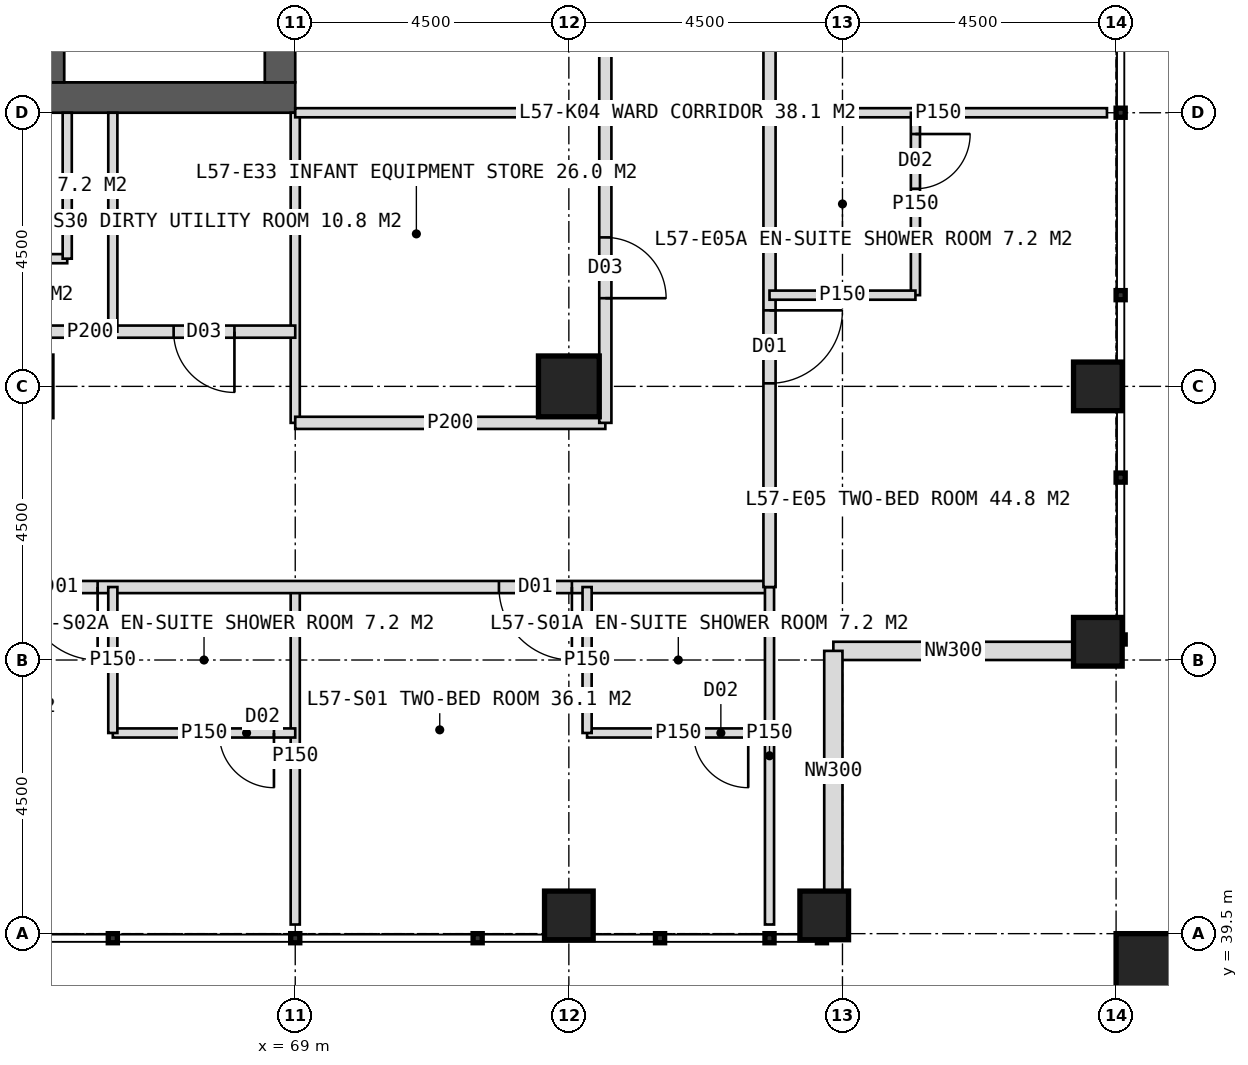
"""IFC4 building model, lengths in metres.
Left out: names, types, materials, properties, quantities, classifications, styles, units other than length and angle.
Written with IfcOpenShell. Run it as: python <this file> out.ifc"""

import sys

from ifc_helpers import new_model, si_unit, direction, frame, frame_2d, origin, origin_2d, place, context, subcontext, project, spatial, rectangle, hollow_rectangle, extrude, element, fill, save


model = new_model("IFC4")
c1 = context("Model", 3, precision=1e-05, world=origin(), true_north=direction((0.0, 1.0)))
c2 = subcontext(c1, "Body", "Model", "MODEL_VIEW")
j1 = project(units=[si_unit("LENGTHUNIT", "METRE"), si_unit("PLANEANGLEUNIT", "RADIAN")], contexts=[c1])
p1 = place(None, origin())
s1 = spatial("IfcSite", under=j1, at=p1, CompositionType="ELEMENT")
p2 = place(p1, origin())
s2 = spatial("IfcBuilding", under=s1, at=p2, CompositionType="ELEMENT")
p3 = place(p2, frame((0.0, 0.0, 237.0)))
s3 = spatial("IfcBuildingStorey", under=s2, at=p3, CompositionType="ELEMENT", Elevation=237.0)
p4 = place(p3, frame((51.0, 53.25, 0.0), z_axis=(0.0, 0.0, 1.0), x_axis=(1.0, 0.0, 0.0)))
e1 = element("IfcWall", 1, at=p4, inside=s3, PredefinedType="SHEAR", context=c2, shape_type="SweptSolid", body=[
    extrude(rectangle(XDim=18.0, YDim=0.5, at=frame_2d((9.0, 0.0))), origin(), (0.0, 0.0, 1.0), 4.0),
])
p5 = place(p4, frame((8.1, 0.0, 0.0)))
e2 = element("IfcOpeningElement", 2, at=p5, cuts=e1, PredefinedType="OPENING", context=c2, shape_type="SweptSolid", body=[
    extrude(rectangle(XDim=1.8, YDim=2.2, at=frame_2d((0.9, 1.1))), frame((0.0, 0.26, 0.0), z_axis=(0.0, -1.0, 0.0), x_axis=(1.0, 0.0, 0.0)), (0.0, 0.0, 1.0), 0.52),
])
p6 = place(p3, frame((68.75, 53.5, 0.0), z_axis=(0.0, 0.0, 1.0), x_axis=(0.0, 1.0, 0.0)))
e3 = element("IfcWall", 3, at=p6, inside=s3, PredefinedType="SHEAR", context=c2, shape_type="SweptSolid", body=[
    extrude(rectangle(XDim=17.0, YDim=0.5, at=frame_2d((8.5, 0.0))), origin(), (0.0, 0.0, 1.0), 4.0),
])
p7 = place(p6, frame((9.6, 0.0, 0.0)))
e4 = element("IfcOpeningElement", 4, at=p7, cuts=e3, PredefinedType="OPENING", context=c2, shape_type="SweptSolid", body=[
    extrude(rectangle(XDim=1.5, YDim=2.2, at=frame_2d((0.75, 1.1))), frame((0.0, 0.26, 0.0), z_axis=(0.0, -1.0, 0.0), x_axis=(1.0, 0.0, 0.0)), (0.0, 0.0, 1.0), 0.52),
])
p8 = place(p3, frame((65.05, 53.5, 0.0), z_axis=(0.0, 0.0, 1.0), x_axis=(0.0, 1.0, 0.0)))
e5 = element("IfcWall", 5, at=p8, inside=s3, PredefinedType="SHEAR", context=c2, shape_type="SweptSolid", body=[
    extrude(rectangle(XDim=17.0, YDim=0.3, at=frame_2d((8.5, 0.0))), origin(), (0.0, 0.0, 1.0), 4.0),
])
p9 = place(p3, frame((73.5, 48.5, 0.0), z_axis=(0.0, 0.0, 1.0), x_axis=(1.0, 0.0, 0.0)))
e6 = element("IfcColumn", 6, at=p9, inside=s3, PredefinedType="COLUMN", context=c2, shape_type="SweptSolid", body=[
    extrude(hollow_rectangle(XDim=1.0, YDim=1.0, WallThickness=0.1, at=origin_2d()), origin(), (0.0, 0.0, 1.0), 4.0),
])
for number, where, z_axis, x_axis in (
    (7, (82.2, 44.3, 0.0), (0.0, 0.0, 1.0), (1.0, 0.0, 0.0)),
    (8, (82.2, 48.5, 0.0), (0.0, 0.0, 1.0), (1.0, 0.0, 0.0)),
    (9, (73.5, 39.8, 0.0), (0.0, 0.0, 1.0), (1.0, 0.0, 0.0)),
    (10, (77.7, 39.8, 0.0), (0.0, 0.0, 1.0), (1.0, 0.0, 0.0)),
):
    element("IfcColumn", number, at=place(p3, frame(where, z_axis=z_axis, x_axis=x_axis)), inside=s3, PredefinedType="COLUMN", context=c2, shape_type="SweptSolid", body=[
        extrude(hollow_rectangle(XDim=0.8, YDim=0.8, WallThickness=0.08, at=origin_2d()), origin(), (0.0, 0.0, 1.0), 4.0),
    ])
p10 = place(p3, frame((83.1, 38.9, 0.0), z_axis=(0.0, 0.0, 1.0), x_axis=(1.0, 0.0, 0.0)))
e11 = element("IfcColumn", 11, at=p10, inside=s3, PredefinedType="COLUMN", context=c2, shape_type="SweptSolid", body=[
    extrude(hollow_rectangle(XDim=1.2, YDim=1.2, WallThickness=0.07, at=origin_2d()), origin(), (0.0, 0.0, 1.0), 4.0),
])
for number, where, z_axis, x_axis in (
    (12, (81.8, 44.15, 0.0), (0.0, 0.0, 1.0), (-1.0, 0.0, 0.0)),
    (13, (77.85, 44.15, 0.0), (0.0, 0.0, 1.0), (0.0, -1.0, 0.0)),
):
    element("IfcWall", number, at=place(p3, frame(where, z_axis=z_axis, x_axis=x_axis)), inside=s3, PredefinedType="ELEMENTEDWALL", context=c2, shape_type="SweptSolid", body=[
        extrude(rectangle(XDim=3.95, YDim=0.3, at=frame_2d((1.975, 0.0))), origin(), (0.0, 0.0, 1.0), 2.85),
    ])
p11 = place(p3, frame((69.0, 45.2, 0.0), z_axis=(0.0, 0.0, 1.0), x_axis=(0.0, -1.0, 0.0)))
e14 = element("IfcWall", 14, at=p11, inside=s3, PredefinedType="PARTITIONING", context=c2, shape_type="SweptSolid", body=[
    extrude(rectangle(XDim=5.55, YDim=0.15, at=frame_2d((2.775, 0.0))), origin(), (0.0, 0.0, 1.0), 3.75),
])
p12 = place(p3, frame((76.8, 45.2, 0.0), z_axis=(0.0, 0.0, 1.0), x_axis=(-1.0, 0.0, 0.0)))
e15 = element("IfcWall", 15, at=p12, inside=s3, PredefinedType="PARTITIONING", context=c2, shape_type="SweptSolid", body=[
    extrude(rectangle(XDim=33.6, YDim=0.2, at=frame_2d((16.8, 0.0))), origin(), (0.0, 0.0, 1.0), 3.75),
])
p13 = place(p12, frame((3.25, 0.0, 0.0)))
e16 = element("IfcOpeningElement", 16, at=p13, cuts=e15, PredefinedType="OPENING", context=c2, shape_type="SweptSolid", body=[
    extrude(rectangle(XDim=1.2, YDim=2.2, at=frame_2d((0.6, 1.1))), frame((0.0, 0.11, 0.0), z_axis=(0.0, -1.0, 0.0), x_axis=(1.0, 0.0, 0.0)), (0.0, 0.0, 1.0), 0.22),
])
p14 = place(p12, frame((11.05, 0.0, 0.0)))
e17 = element("IfcOpeningElement", 17, at=p14, cuts=e15, PredefinedType="OPENING", context=c2, shape_type="SweptSolid", body=[
    extrude(rectangle(XDim=1.2, YDim=2.2, at=frame_2d((0.6, 1.1))), frame((0.0, 0.11, 0.0), z_axis=(0.0, -1.0, 0.0), x_axis=(1.0, 0.0, 0.0)), (0.0, 0.0, 1.0), 0.22),
])
p15 = place(p12, frame((19.45, 0.0, 0.0)))
e18 = element("IfcOpeningElement", 18, at=p15, cuts=e15, PredefinedType="OPENING", context=c2, shape_type="SweptSolid", body=[
    extrude(rectangle(XDim=1.2, YDim=2.2, at=frame_2d((0.6, 1.1))), frame((0.0, 0.11, 0.0), z_axis=(0.0, -1.0, 0.0), x_axis=(1.0, 0.0, 0.0)), (0.0, 0.0, 1.0), 0.22),
])
p16 = place(p12, frame((25.45, 0.0, 0.0)))
e19 = element("IfcOpeningElement", 19, at=p16, cuts=e15, PredefinedType="OPENING", context=c2, shape_type="SweptSolid", body=[
    extrude(rectangle(XDim=1.2, YDim=2.2, at=frame_2d((0.6, 1.1))), frame((0.0, 0.11, 0.0), z_axis=(0.0, -1.0, 0.0), x_axis=(1.0, 0.0, 0.0)), (0.0, 0.0, 1.0), 0.22),
])
p17 = place(p3, frame((76.8, 45.2, 0.0), z_axis=(0.0, 0.0, 1.0), x_axis=(0.0, -1.0, 0.0)))
e20 = element("IfcWall", 20, at=p17, inside=s3, PredefinedType="PARTITIONING", context=c2, shape_type="SweptSolid", body=[
    extrude(rectangle(XDim=5.55, YDim=0.15, at=frame_2d((2.775, 0.0))), origin(), (0.0, 0.0, 1.0), 3.75),
])
p18 = place(p3, frame((76.8, 42.8, 0.0), z_axis=(0.0, 0.0, 1.0), x_axis=(-1.0, 0.0, 0.0)))
e21 = element("IfcWall", 21, at=p18, inside=s3, PredefinedType="PARTITIONING", context=c2, shape_type="SweptSolid", body=[
    extrude(rectangle(XDim=3.0, YDim=0.15, at=frame_2d((1.5, 0.0))), origin(), (0.0, 0.0, 1.0), 3.75),
])
p19 = place(p18, frame((0.35, 0.0, 0.0)))
e22 = element("IfcOpeningElement", 22, at=p19, cuts=e21, PredefinedType="OPENING", context=c2, shape_type="SweptSolid", body=[
    extrude(rectangle(XDim=0.9, YDim=2.1, at=frame_2d((0.45, 1.05))), frame((0.0, 0.085, 0.0), z_axis=(0.0, -1.0, 0.0), x_axis=(1.0, 0.0, 0.0)), (0.0, 0.0, 1.0), 0.17),
])
p20 = place(p3, frame((73.8, 45.2, 0.0), z_axis=(0.0, 0.0, 1.0), x_axis=(0.0, -1.0, 0.0)))
e23 = element("IfcWall", 23, at=p20, inside=s3, PredefinedType="PARTITIONING", context=c2, shape_type="SweptSolid", body=[
    extrude(rectangle(XDim=2.4, YDim=0.15, at=frame_2d((1.2, 0.0))), origin(), (0.0, 0.0, 1.0), 3.75),
])
p21 = place(p3, frame((69.0, 42.8, 0.0), z_axis=(0.0, 0.0, 1.0), x_axis=(-1.0, 0.0, 0.0)))
e24 = element("IfcWall", 24, at=p21, inside=s3, PredefinedType="PARTITIONING", context=c2, shape_type="SweptSolid", body=[
    extrude(rectangle(XDim=3.0, YDim=0.15, at=frame_2d((1.5, 0.0))), origin(), (0.0, 0.0, 1.0), 3.75),
])
p22 = place(p21, frame((0.35, 0.0, 0.0)))
e25 = element("IfcOpeningElement", 25, at=p22, cuts=e24, PredefinedType="OPENING", context=c2, shape_type="SweptSolid", body=[
    extrude(rectangle(XDim=0.9, YDim=2.1, at=frame_2d((0.45, 1.05))), frame((0.0, 0.085, 0.0), z_axis=(0.0, -1.0, 0.0), x_axis=(1.0, 0.0, 0.0)), (0.0, 0.0, 1.0), 0.17),
])
p23 = place(p3, frame((66.0, 45.2, 0.0), z_axis=(0.0, 0.0, 1.0), x_axis=(0.0, -1.0, 0.0)))
e26 = element("IfcWall", 26, at=p23, inside=s3, PredefinedType="PARTITIONING", context=c2, shape_type="SweptSolid", body=[
    extrude(rectangle(XDim=2.4, YDim=0.15, at=frame_2d((1.2, 0.0))), origin(), (0.0, 0.0, 1.0), 3.75),
])
p24 = place(p3, frame((69.0, 53.0, 0.0), z_axis=(0.0, 0.0, 1.0), x_axis=(0.0, -1.0, 0.0)))
e27 = element("IfcWall", 27, at=p24, inside=s3, PredefinedType="PARTITIONING", context=c2, shape_type="SweptSolid", body=[
    extrude(rectangle(XDim=5.1, YDim=0.15, at=frame_2d((2.55, 0.0))), origin(), (0.0, 0.0, 1.0), 3.75),
])
p25 = place(p3, frame((74.1, 47.9, 0.0), z_axis=(0.0, 0.0, 1.0), x_axis=(-1.0, 0.0, 0.0)))
e28 = element("IfcWall", 28, at=p25, inside=s3, PredefinedType="PARTITIONING", context=c2, shape_type="SweptSolid", body=[
    extrude(rectangle(XDim=5.1, YDim=0.2, at=frame_2d((2.55, 0.0))), origin(), (0.0, 0.0, 1.0), 3.75),
])
p26 = place(p3, frame((69.0, 49.4, 0.0), z_axis=(0.0, 0.0, 1.0), x_axis=(-1.0, 0.0, 0.0)))
e29 = element("IfcWall", 29, at=p26, inside=s3, PredefinedType="PARTITIONING", context=c2, shape_type="SweptSolid", body=[
    extrude(rectangle(XDim=6.75, YDim=0.2, at=frame_2d((3.375, 0.0))), origin(), (0.0, 0.0, 1.0), 3.75),
])
p27 = place(p26, frame((1.0, 0.0, 0.0)))
e30 = element("IfcOpeningElement", 30, at=p27, cuts=e29, PredefinedType="OPENING", context=c2, shape_type="SweptSolid", body=[
    extrude(rectangle(XDim=1.0, YDim=2.1, at=frame_2d((0.5, 1.05))), frame((0.0, 0.11, 0.0), z_axis=(0.0, -1.0, 0.0), x_axis=(1.0, 0.0, 0.0)), (0.0, 0.0, 1.0), 0.22),
])
p28 = place(p26, frame((5.425, 0.0, 0.0)))
e31 = element("IfcOpeningElement", 31, at=p28, cuts=e29, PredefinedType="OPENING", context=c2, shape_type="SweptSolid", body=[
    extrude(rectangle(XDim=1.0, YDim=2.1, at=frame_2d((0.5, 1.05))), frame((0.0, 0.11, 0.0), z_axis=(0.0, -1.0, 0.0), x_axis=(1.0, 0.0, 0.0)), (0.0, 0.0, 1.0), 0.22),
])
p29 = place(p3, frame((66.0, 53.0, 0.0), z_axis=(0.0, 0.0, 1.0), x_axis=(0.0, -1.0, 0.0)))
e32 = element("IfcWall", 32, at=p29, inside=s3, PredefinedType="PARTITIONING", context=c2, shape_type="SweptSolid", body=[
    extrude(rectangle(XDim=3.6, YDim=0.15, at=frame_2d((1.8, 0.0))), origin(), (0.0, 0.0, 1.0), 3.75),
])
p30 = place(p3, frame((65.25, 50.6, 0.0), z_axis=(0.0, 0.0, 1.0), x_axis=(-1.0, 0.0, 0.0)))
e33 = element("IfcWall", 33, at=p30, inside=s3, PredefinedType="PARTITIONING", context=c2, shape_type="SweptSolid", body=[
    extrude(rectangle(XDim=3.0, YDim=0.15, at=frame_2d((1.5, 0.0))), origin(), (0.0, 0.0, 1.0), 3.75),
])
p31 = place(p3, frame((65.25, 53.0, 0.0), z_axis=(0.0, 0.0, 1.0), x_axis=(0.0, -1.0, 0.0)))
e34 = element("IfcWall", 34, at=p31, inside=s3, PredefinedType="PARTITIONING", context=c2, shape_type="SweptSolid", body=[
    extrude(rectangle(XDim=2.4, YDim=0.15, at=frame_2d((1.2, 0.0))), origin(), (0.0, 0.0, 1.0), 3.75),
])
p32 = place(p3, frame((76.8, 53.0, 0.0), z_axis=(0.0, 0.0, 1.0), x_axis=(1.0, 0.0, 0.0)))
e35 = element("IfcWall", 35, at=p32, inside=s3, PredefinedType="PARTITIONING", context=c2, shape_type="SweptSolid", body=[
    extrude(rectangle(XDim=5.55, YDim=0.15, at=frame_2d((2.775, 0.0))), origin(), (0.0, 0.0, 1.0), 3.75),
])
p33 = place(p3, frame((76.8, 78.8, 0.0), z_axis=(0.0, 0.0, 1.0), x_axis=(0.0, -1.0, 0.0)))
e36 = element("IfcWall", 36, at=p33, inside=s3, PredefinedType="PARTITIONING", context=c2, shape_type="SweptSolid", body=[
    extrude(rectangle(XDim=33.6, YDim=0.2, at=frame_2d((16.8, 0.0))), origin(), (0.0, 0.0, 1.0), 3.75),
])
p34 = place(p33, frame((2.65, 0.0, 0.0)))
e37 = element("IfcOpeningElement", 37, at=p34, cuts=e36, PredefinedType="OPENING", context=c2, shape_type="SweptSolid", body=[
    extrude(rectangle(XDim=1.2, YDim=2.2, at=frame_2d((0.6, 1.1))), frame((0.0, 0.11, 0.0), z_axis=(0.0, -1.0, 0.0), x_axis=(1.0, 0.0, 0.0)), (0.0, 0.0, 1.0), 0.22),
])
p35 = place(p33, frame((7.45, 0.0, 0.0)))
e38 = element("IfcOpeningElement", 38, at=p35, cuts=e36, PredefinedType="OPENING", context=c2, shape_type="SweptSolid", body=[
    extrude(rectangle(XDim=1.2, YDim=2.2, at=frame_2d((0.6, 1.1))), frame((0.0, 0.11, 0.0), z_axis=(0.0, -1.0, 0.0), x_axis=(1.0, 0.0, 0.0)), (0.0, 0.0, 1.0), 0.22),
])
p36 = place(p33, frame((13.45, 0.0, 0.0)))
e39 = element("IfcOpeningElement", 39, at=p36, cuts=e36, PredefinedType="OPENING", context=c2, shape_type="SweptSolid", body=[
    extrude(rectangle(XDim=1.2, YDim=2.2, at=frame_2d((0.6, 1.1))), frame((0.0, 0.11, 0.0), z_axis=(0.0, -1.0, 0.0), x_axis=(1.0, 0.0, 0.0)), (0.0, 0.0, 1.0), 0.22),
])
p37 = place(p33, frame((20.05, 0.0, 0.0)))
e40 = element("IfcOpeningElement", 40, at=p37, cuts=e36, PredefinedType="OPENING", context=c2, shape_type="SweptSolid", body=[
    extrude(rectangle(XDim=1.2, YDim=2.2, at=frame_2d((0.6, 1.1))), frame((0.0, 0.11, 0.0), z_axis=(0.0, -1.0, 0.0), x_axis=(1.0, 0.0, 0.0)), (0.0, 0.0, 1.0), 0.22),
])
p38 = place(p33, frame((29.05, 0.0, 0.0)))
e41 = element("IfcOpeningElement", 41, at=p38, cuts=e36, PredefinedType="OPENING", context=c2, shape_type="SweptSolid", body=[
    extrude(rectangle(XDim=1.2, YDim=2.2, at=frame_2d((0.6, 1.1))), frame((0.0, 0.11, 0.0), z_axis=(0.0, -1.0, 0.0), x_axis=(1.0, 0.0, 0.0)), (0.0, 0.0, 1.0), 0.22),
])
p39 = place(p3, frame((79.2, 53.0, 0.0), z_axis=(0.0, 0.0, 1.0), x_axis=(0.0, -1.0, 0.0)))
e42 = element("IfcWall", 42, at=p39, inside=s3, PredefinedType="PARTITIONING", context=c2, shape_type="SweptSolid", body=[
    extrude(rectangle(XDim=3.0, YDim=0.15, at=frame_2d((1.5, 0.0))), origin(), (0.0, 0.0, 1.0), 3.75),
])
p40 = place(p39, frame((0.35, 0.0, 0.0)))
e43 = element("IfcOpeningElement", 43, at=p40, cuts=e42, PredefinedType="OPENING", context=c2, shape_type="SweptSolid", body=[
    extrude(rectangle(XDim=0.9, YDim=2.1, at=frame_2d((0.45, 1.05))), frame((0.0, 0.085, 0.0), z_axis=(0.0, -1.0, 0.0), x_axis=(1.0, 0.0, 0.0)), (0.0, 0.0, 1.0), 0.17),
])
p41 = place(p3, frame((76.8, 50.0, 0.0), z_axis=(0.0, 0.0, 1.0), x_axis=(1.0, 0.0, 0.0)))
e44 = element("IfcWall", 44, at=p41, inside=s3, PredefinedType="PARTITIONING", context=c2, shape_type="SweptSolid", body=[
    extrude(rectangle(XDim=2.4, YDim=0.15, at=frame_2d((1.2, 0.0))), origin(), (0.0, 0.0, 1.0), 3.75),
])
p42 = place(p3, frame((74.1, 62.0, 0.0), z_axis=(0.0, 0.0, 1.0), x_axis=(0.0, -1.0, 0.0)))
e45 = element("IfcWall", 45, at=p42, inside=s3, PredefinedType="PARTITIONING", context=c2, shape_type="SweptSolid", body=[
    extrude(rectangle(XDim=14.1, YDim=0.2, at=frame_2d((7.05, 0.0))), origin(), (0.0, 0.0, 1.0), 3.75),
])
p43 = place(p42, frame((2.5, 0.0, 0.0)))
e46 = element("IfcOpeningElement", 46, at=p43, cuts=e45, PredefinedType="OPENING", context=c2, shape_type="SweptSolid", body=[
    extrude(rectangle(XDim=1.0, YDim=2.1, at=frame_2d((0.5, 1.05))), frame((0.0, 0.11, 0.0), z_axis=(0.0, -1.0, 0.0), x_axis=(1.0, 0.0, 0.0)), (0.0, 0.0, 1.0), 0.22),
])
p44 = place(p42, frame((7.0, 0.0, 0.0)))
e47 = element("IfcOpeningElement", 47, at=p44, cuts=e45, PredefinedType="OPENING", context=c2, shape_type="SweptSolid", body=[
    extrude(rectangle(XDim=1.0, YDim=2.1, at=frame_2d((0.5, 1.05))), frame((0.0, 0.11, 0.0), z_axis=(0.0, -1.0, 0.0), x_axis=(1.0, 0.0, 0.0)), (0.0, 0.0, 1.0), 0.22),
])
p45 = place(p42, frame((11.05, 0.0, 0.0)))
e48 = element("IfcOpeningElement", 48, at=p45, cuts=e45, PredefinedType="OPENING", context=c2, shape_type="SweptSolid", body=[
    extrude(rectangle(XDim=1.0, YDim=2.1, at=frame_2d((0.5, 1.05))), frame((0.0, 0.11, 0.0), z_axis=(0.0, -1.0, 0.0), x_axis=(1.0, 0.0, 0.0)), (0.0, 0.0, 1.0), 0.22),
])
p46 = place(p3, frame((69.0, 53.0, 0.0), z_axis=(0.0, 0.0, 1.0), x_axis=(1.0, 0.0, 0.0)))
e49 = element("IfcWall", 49, at=p46, inside=s3, PredefinedType="PARTITIONING", context=c2, shape_type="SweptSolid", body=[
    extrude(rectangle(XDim=5.1, YDim=0.15, at=frame_2d((2.55, 0.0))), origin(), (0.0, 0.0, 1.0), 3.75),
])
p47 = place(p13, origin())
e50 = element("IfcDoor", 50, at=p47, inside=s3, OperationType="SINGLE_SWING_LEFT", PredefinedType="DOOR", context=c2, shape_type="SweptSolid", body=[
    extrude(rectangle(XDim=1.2, YDim=2.2, at=frame_2d((0.6, 1.1))), frame((0.0, 0.025, 0.0), z_axis=(0.0, -1.0, 0.0), x_axis=(1.0, 0.0, 0.0)), (0.0, 0.0, 1.0), 0.05),
])
fill(e16, e50)
p48 = place(p19, origin())
e51 = element("IfcDoor", 51, at=p48, inside=s3, OperationType="SINGLE_SWING_LEFT", PredefinedType="DOOR", context=c2, shape_type="SweptSolid", body=[
    extrude(rectangle(XDim=0.9, YDim=2.1, at=frame_2d((0.45, 1.05))), frame((0.0, 0.025, 0.0), z_axis=(0.0, -1.0, 0.0), x_axis=(1.0, 0.0, 0.0)), (0.0, 0.0, 1.0), 0.05),
])
fill(e22, e51)
p49 = place(p14, origin())
e52 = element("IfcDoor", 52, at=p49, inside=s3, OperationType="SINGLE_SWING_LEFT", PredefinedType="DOOR", context=c2, shape_type="SweptSolid", body=[
    extrude(rectangle(XDim=1.2, YDim=2.2, at=frame_2d((0.6, 1.1))), frame((0.0, 0.025, 0.0), z_axis=(0.0, -1.0, 0.0), x_axis=(1.0, 0.0, 0.0)), (0.0, 0.0, 1.0), 0.05),
])
fill(e17, e52)
p50 = place(p22, origin())
e53 = element("IfcDoor", 53, at=p50, inside=s3, OperationType="SINGLE_SWING_LEFT", PredefinedType="DOOR", context=c2, shape_type="SweptSolid", body=[
    extrude(rectangle(XDim=0.9, YDim=2.1, at=frame_2d((0.45, 1.05))), frame((0.0, 0.025, 0.0), z_axis=(0.0, -1.0, 0.0), x_axis=(1.0, 0.0, 0.0)), (0.0, 0.0, 1.0), 0.05),
])
fill(e25, e53)
p51 = place(p27, origin())
e54 = element("IfcDoor", 54, at=p51, inside=s3, OperationType="SINGLE_SWING_LEFT", PredefinedType="DOOR", context=c2, shape_type="SweptSolid", body=[
    extrude(rectangle(XDim=1.0, YDim=2.1, at=frame_2d((0.5, 1.05))), frame((0.0, 0.025, 0.0), z_axis=(0.0, -1.0, 0.0), x_axis=(1.0, 0.0, 0.0)), (0.0, 0.0, 1.0), 0.05),
])
fill(e30, e54)
p52 = place(p38, origin())
e55 = element("IfcDoor", 55, at=p52, inside=s3, OperationType="SINGLE_SWING_LEFT", PredefinedType="DOOR", context=c2, shape_type="SweptSolid", body=[
    extrude(rectangle(XDim=1.2, YDim=2.2, at=frame_2d((0.6, 1.1))), frame((0.0, 0.025, 0.0), z_axis=(0.0, -1.0, 0.0), x_axis=(1.0, 0.0, 0.0)), (0.0, 0.0, 1.0), 0.05),
])
fill(e41, e55)
p53 = place(p40, origin())
e56 = element("IfcDoor", 56, at=p53, inside=s3, OperationType="SINGLE_SWING_LEFT", PredefinedType="DOOR", context=c2, shape_type="SweptSolid", body=[
    extrude(rectangle(XDim=0.9, YDim=2.1, at=frame_2d((0.45, 1.05))), frame((0.0, 0.025, 0.0), z_axis=(0.0, -1.0, 0.0), x_axis=(1.0, 0.0, 0.0)), (0.0, 0.0, 1.0), 0.05),
])
fill(e43, e56)
p54 = place(p45, origin())
e57 = element("IfcDoor", 57, at=p54, inside=s3, OperationType="SINGLE_SWING_RIGHT", PredefinedType="DOOR", context=c2, shape_type="SweptSolid", body=[
    extrude(rectangle(XDim=1.0, YDim=2.1, at=frame_2d((0.5, 1.05))), frame((0.0, 0.025, 0.0), z_axis=(0.0, -1.0, 0.0), x_axis=(1.0, 0.0, 0.0)), (0.0, 0.0, 1.0), 0.05),
])
fill(e48, e57)
save(model, sys.argv[1])
